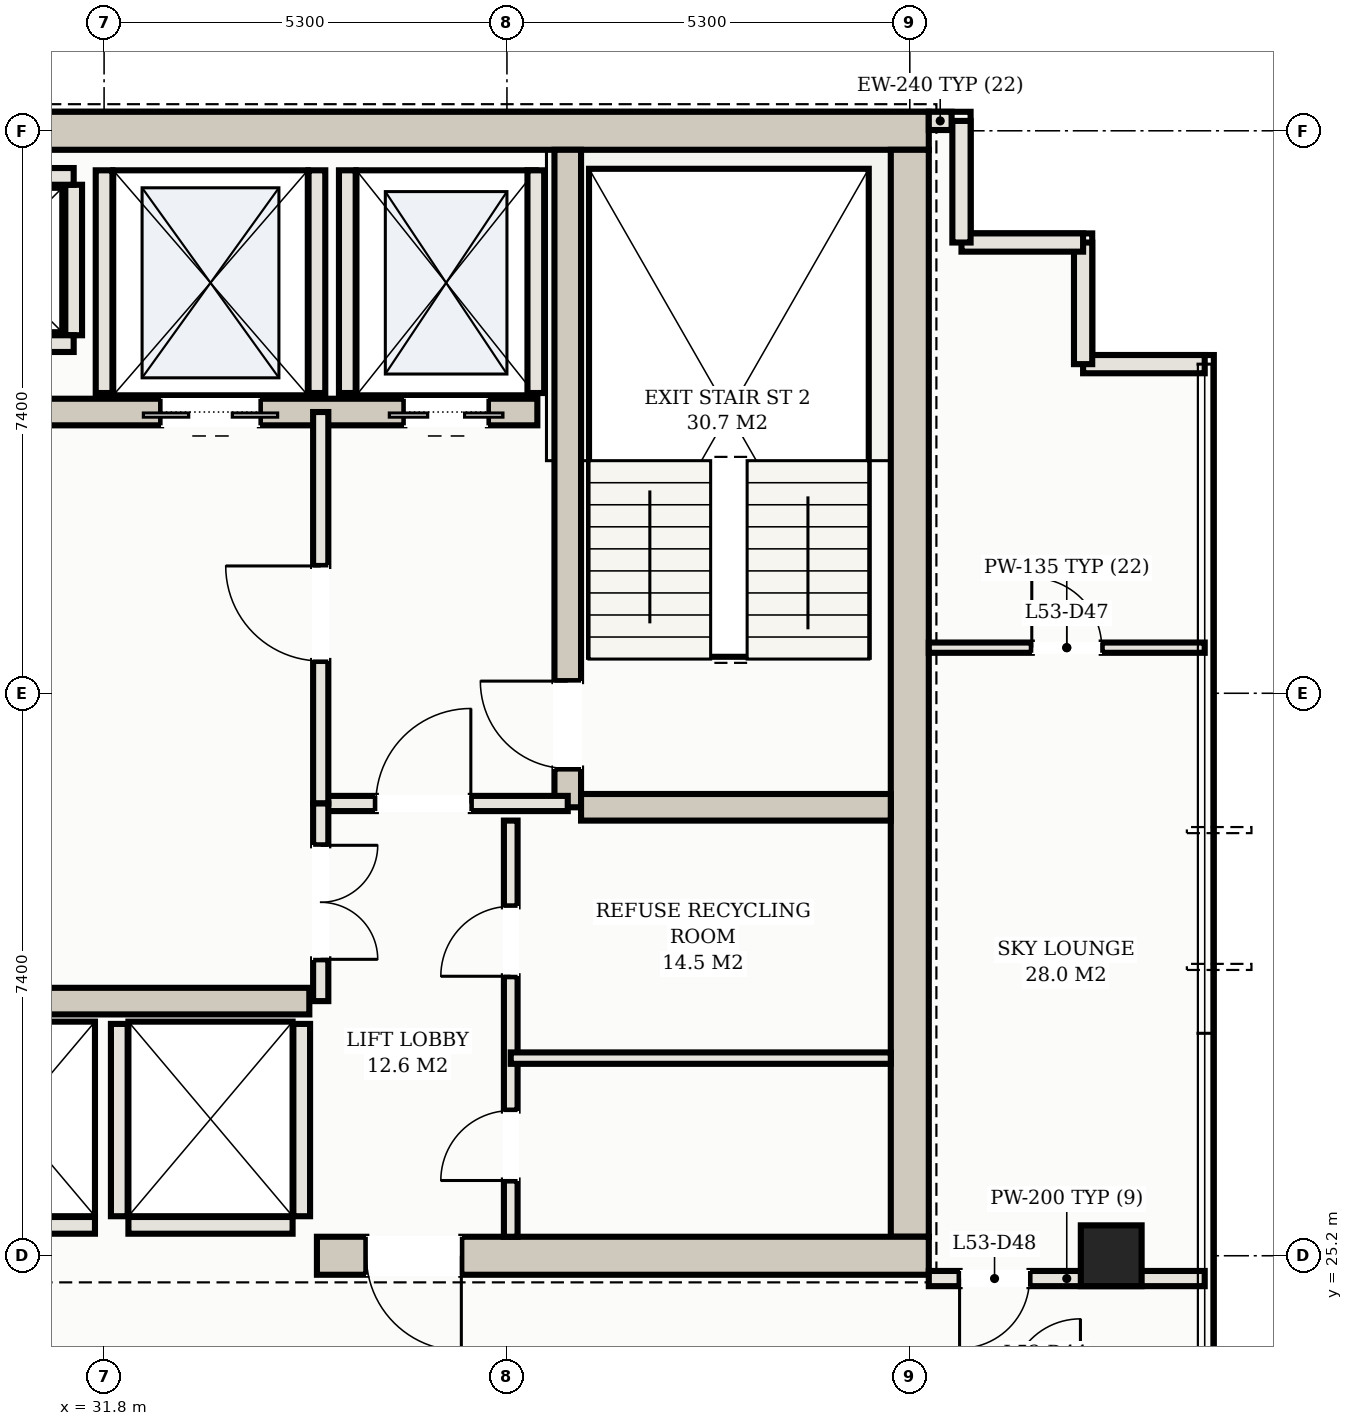
"""IFC4 building model, lengths in metres.
Left out: names, types, materials, properties, quantities, classifications, styles, units other than length and angle.
Written with IfcOpenShell. Run it as: python <this file> out.ifc"""

import sys

from ifc_helpers import new_model, si_unit, direction, frame, frame_2d, origin, origin_2d, place, context, subcontext, project, spatial, rectangle, hollow_rectangle, extrude, element, fill, save


model = new_model("IFC4")
c1 = context("Model", 3, precision=1e-05, world=origin(), true_north=direction((0.0, 1.0)))
c2 = subcontext(c1, "Body", "Model", "MODEL_VIEW")
j1 = project(units=[si_unit("LENGTHUNIT", "METRE"), si_unit("PLANEANGLEUNIT", "RADIAN")], contexts=[c1])
p1 = place(None, origin())
s1 = spatial("IfcSite", under=j1, at=p1, CompositionType="ELEMENT")
p2 = place(p1, origin())
s2 = spatial("IfcBuilding", under=s1, at=p2, CompositionType="ELEMENT")
p3 = place(p2, frame((0.0, 0.0, 196.7)))
s3 = spatial("IfcBuildingStorey", under=s2, at=p3, CompositionType="ELEMENT", Elevation=196.7)
p4 = place(p3, frame((10.35, 40.0, 0.0), z_axis=(0.0, 0.0, 1.0), x_axis=(1.0, 0.0, 0.0)))
e1 = element("IfcWall", 1, at=p4, inside=s3, PredefinedType="SHEAR", context=c2, shape_type="SweptSolid", body=[
    extrude(rectangle(XDim=32.3, YDim=0.5, at=frame_2d((16.15, 0.0))), origin(), (0.0, 0.0, 1.0), 3.11),
])
p5 = place(p3, frame((42.4, 25.45, 0.0), z_axis=(0.0, 0.0, 1.0), x_axis=(0.0, 1.0, 0.0)))
e2 = element("IfcWall", 2, at=p5, inside=s3, PredefinedType="SHEAR", context=c2, shape_type="SweptSolid", body=[
    extrude(rectangle(XDim=14.3, YDim=0.5, at=frame_2d((7.15, 0.0))), origin(), (0.0, 0.0, 1.0), 3.11),
])
p6 = place(p3, frame((34.6, 25.2, 0.0), z_axis=(0.0, 0.0, 1.0), x_axis=(1.0, 0.0, 0.0)))
e3 = element("IfcWall", 3, at=p6, inside=s3, PredefinedType="SHEAR", context=c2, shape_type="SweptSolid", body=[
    extrude(rectangle(XDim=8.05, YDim=0.5, at=frame_2d((4.025, 0.0))), origin(), (0.0, 0.0, 1.0), 3.11),
])
p7 = place(p6, frame((0.65, 0.0, 0.0)))
e4 = element("IfcOpeningElement", 4, at=p7, cuts=e3, PredefinedType="OPENING", context=c2, shape_type="SweptSolid", body=[
    extrude(rectangle(XDim=1.25, YDim=2.2, at=frame_2d((0.625, 1.1))), frame((0.0, 0.26, 0.0), z_axis=(0.0, -1.0, 0.0), x_axis=(1.0, 0.0, 0.0)), (0.0, 0.0, 1.0), 0.52),
])
p8 = place(p3, frame((37.9, 31.1, 0.0), z_axis=(0.0, 0.0, 1.0), x_axis=(0.0, 1.0, 0.0)))
e5 = element("IfcWall", 5, at=p8, inside=s3, PredefinedType="SHEAR", context=c2, shape_type="SweptSolid", body=[
    extrude(rectangle(XDim=8.65, YDim=0.35, at=frame_2d((4.325, 0.0))), origin(), (0.0, 0.0, 1.0), 3.11),
])
p9 = place(p8, frame((0.51, 0.0, 0.0)))
e6 = element("IfcOpeningElement", 6, at=p9, cuts=e5, PredefinedType="OPENING", context=c2, shape_type="SweptSolid", body=[
    extrude(rectangle(XDim=1.15, YDim=2.2, at=frame_2d((0.575, 1.1))), frame((0.0, 0.185, 0.0), z_axis=(0.0, -1.0, 0.0), x_axis=(1.0, 0.0, 0.0)), (0.0, 0.0, 1.0), 0.37),
])
p10 = place(p3, frame((38.075, 31.1, 0.0), z_axis=(0.0, 0.0, 1.0), x_axis=(1.0, 0.0, 0.0)))
e7 = element("IfcWall", 7, at=p10, inside=s3, PredefinedType="SHEAR", context=c2, shape_type="SweptSolid", body=[
    extrude(rectangle(XDim=4.075, YDim=0.35, at=frame_2d((2.038, 0.0))), origin(), (0.0, 0.0, 1.0), 3.11),
])
p11 = place(p3, frame((15.5, 36.3, 0.0), z_axis=(0.0, 0.0, 1.0), x_axis=(1.0, 0.0, 0.0)))
e8 = element("IfcWall", 8, at=p11, inside=s3, PredefinedType="SHEAR", context=c2, shape_type="SweptSolid", body=[
    extrude(rectangle(XDim=22.0, YDim=0.35, at=frame_2d((11.0, 0.0))), origin(), (0.0, 0.0, 1.0), 3.11),
])
p12 = place(p11, frame((0.65, 0.0, 0.0)))
e9 = element("IfcOpeningElement", 9, at=p12, cuts=e8, PredefinedType="OPENING", context=c2, shape_type="SweptSolid", body=[
    extrude(rectangle(XDim=1.1, YDim=2.15, at=frame_2d((0.55, 1.075))), frame((0.0, 0.185, 0.0), z_axis=(0.0, -1.0, 0.0), x_axis=(1.0, 0.0, 0.0)), (0.0, 0.0, 1.0), 0.37),
])
p13 = place(p11, frame((20.25, 0.0, 0.0)))
e10 = element("IfcOpeningElement", 10, at=p13, cuts=e8, PredefinedType="OPENING", context=c2, shape_type="SweptSolid", body=[
    extrude(rectangle(XDim=1.1, YDim=2.15, at=frame_2d((0.55, 1.075))), frame((0.0, 0.185, 0.0), z_axis=(0.0, -1.0, 0.0), x_axis=(1.0, 0.0, 0.0)), (0.0, 0.0, 1.0), 0.37),
])
p14 = place(p11, frame((17.05, 0.0, 0.0)))
e11 = element("IfcOpeningElement", 11, at=p14, cuts=e8, PredefinedType="OPENING", context=c2, shape_type="SweptSolid", body=[
    extrude(rectangle(XDim=1.3, YDim=2.2, at=frame_2d((0.65, 1.1))), frame((0.0, 0.185, 0.0), z_axis=(0.0, -1.0, 0.0), x_axis=(1.0, 0.0, 0.0)), (0.0, 0.0, 1.0), 0.37),
])
p15 = place(p11, frame((3.95, 0.0, 0.0)))
e12 = element("IfcOpeningElement", 12, at=p15, cuts=e8, PredefinedType="OPENING", context=c2, shape_type="SweptSolid", body=[
    extrude(rectangle(XDim=1.1, YDim=2.15, at=frame_2d((0.55, 1.075))), frame((0.0, 0.185, 0.0), z_axis=(0.0, -1.0, 0.0), x_axis=(1.0, 0.0, 0.0)), (0.0, 0.0, 1.0), 0.37),
])
p16 = place(p11, frame((6.55, 0.0, 0.0)))
e13 = element("IfcOpeningElement", 13, at=p16, cuts=e8, PredefinedType="OPENING", context=c2, shape_type="SweptSolid", body=[
    extrude(rectangle(XDim=1.1, YDim=2.15, at=frame_2d((0.55, 1.075))), frame((0.0, 0.185, 0.0), z_axis=(0.0, -1.0, 0.0), x_axis=(1.0, 0.0, 0.0)), (0.0, 0.0, 1.0), 0.37),
])
p17 = place(p11, frame((9.15, 0.0, 0.0)))
e14 = element("IfcOpeningElement", 14, at=p17, cuts=e8, PredefinedType="OPENING", context=c2, shape_type="SweptSolid", body=[
    extrude(rectangle(XDim=1.1, YDim=2.15, at=frame_2d((0.55, 1.075))), frame((0.0, 0.185, 0.0), z_axis=(0.0, -1.0, 0.0), x_axis=(1.0, 0.0, 0.0)), (0.0, 0.0, 1.0), 0.37),
])
p18 = place(p3, frame((18.5, 28.55, 0.0), z_axis=(0.0, 0.0, 1.0), x_axis=(1.0, 0.0, 0.0)))
e15 = element("IfcWall", 15, at=p18, inside=s3, PredefinedType="SHEAR", context=c2, shape_type="SweptSolid", body=[
    extrude(rectangle(XDim=16.0, YDim=0.35, at=frame_2d((8.0, 0.0))), origin(), (0.0, 0.0, 1.0), 3.11),
])
p19 = place(p3, frame((45.05, 25.2, 0.0), z_axis=(0.0, 0.0, 1.0), x_axis=(1.0, 0.0, 0.0)))
e16 = element("IfcColumn", 16, at=p19, inside=s3, PredefinedType="COLUMN", context=c2, shape_type="SweptSolid", body=[
    extrude(hollow_rectangle(XDim=0.8, YDim=0.8, WallThickness=0.028, at=origin_2d()), origin(), (0.0, 0.0, 1.0), 3.3),
])
for number, where, z_axis, x_axis in (
    (17, (35.0, 36.55, 0.0), (0.0, 0.0, 1.0), (0.0, 1.0, 0.0)),
    (18, (37.48, 36.55, 0.0), (0.0, 0.0, 1.0), (0.0, 1.0, 0.0)),
    (19, (31.8, 36.55, 0.0), (0.0, 0.0, 1.0), (0.0, 1.0, 0.0)),
    (20, (34.6, 36.55, 0.0), (0.0, 0.0, 1.0), (0.0, 1.0, 0.0)),
):
    element("IfcWall", number, at=place(p3, frame(where, z_axis=z_axis, x_axis=x_axis)), inside=s3, PredefinedType="SOLIDWALL", context=c2, shape_type="SweptSolid", body=[
        extrude(rectangle(XDim=2.93, YDim=0.22, at=frame_2d((1.465, 0.0))), origin(), (0.0, 0.0, 1.0), 3.11),
    ])
p20 = place(p3, frame((29.52, 25.6, 0.0), z_axis=(0.0, 0.0, 1.0), x_axis=(1.0, 0.0, 0.0)))
e21 = element("IfcWall", 21, at=p20, inside=s3, PredefinedType="SOLIDWALL", context=c2, shape_type="SweptSolid", body=[
    extrude(rectangle(XDim=2.16, YDim=0.22, at=frame_2d((1.08, 0.0))), origin(), (0.0, 0.0, 1.0), 2.305),
])
for number, where, z_axis, x_axis in (
    (22, (32.0, 25.72, 0.0), (0.0, 0.0, 1.0), (0.0, 1.0, 0.0)),
    (23, (34.4, 25.72, 0.0), (0.0, 0.0, 1.0), (0.0, 1.0, 0.0)),
):
    element("IfcWall", number, at=place(p3, frame(where, z_axis=z_axis, x_axis=x_axis)), inside=s3, PredefinedType="SOLIDWALL", context=c2, shape_type="SweptSolid", body=[
        extrude(rectangle(XDim=2.53, YDim=0.22, at=frame_2d((1.265, 0.0))), origin(), (0.0, 0.0, 1.0), 3.11),
    ])
p21 = place(p3, frame((32.12, 25.6, 0.0), z_axis=(0.0, 0.0, 1.0), x_axis=(1.0, 0.0, 0.0)))
e24 = element("IfcWall", 24, at=p21, inside=s3, PredefinedType="SOLIDWALL", context=c2, shape_type="SweptSolid", body=[
    extrude(rectangle(XDim=2.16, YDim=0.22, at=frame_2d((1.08, 0.0))), origin(), (0.0, 0.0, 1.0), 2.305),
])
p22 = place(p3, frame((31.4, 37.31, 0.0), z_axis=(0.0, 0.0, 1.0), x_axis=(0.0, 1.0, 0.0)))
e25 = element("IfcWall", 25, at=p22, inside=s3, PredefinedType="SOLIDWALL", context=c2, shape_type="SweptSolid", body=[
    extrude(rectangle(XDim=1.98, YDim=0.22, at=frame_2d((0.99, 0.0))), origin(), (0.0, 0.0, 1.0), 3.11),
])
for number, where, z_axis, x_axis in (
    (26, (29.2, 39.4, 0.0), (0.0, 0.0, 1.0), (1.0, 0.0, 0.0)),
    (27, (29.2, 37.2, 0.0), (0.0, 0.0, 1.0), (1.0, 0.0, 0.0)),
):
    element("IfcWall", number, at=place(p3, frame(where, z_axis=z_axis, x_axis=x_axis)), inside=s3, PredefinedType="SOLIDWALL", context=c2, shape_type="SweptSolid", body=[
        extrude(rectangle(XDim=2.2, YDim=0.22, at=frame_2d((1.1, 0.0))), origin(), (0.0, 0.0, 1.0), 3.11),
    ])
for number, where, z_axis, x_axis in (
    (28, (46.28, 36.93, 0.0), (0.0, 0.0, 1.0), (-1.0, 0.0, 0.0)),
    (29, (44.68, 36.93, 0.0), (0.0, 0.0, 1.0), (0.0, 1.0, 0.0)),
):
    element("IfcWall", number, at=place(p3, frame(where, z_axis=z_axis, x_axis=x_axis)), inside=s3, PredefinedType="SOLIDWALL", context=c2, shape_type="SweptSolid", body=[
        extrude(rectangle(XDim=1.6, YDim=0.24, at=frame_2d((0.8, 0.0))), origin(), (0.0, 0.0, 1.0), 3.11),
    ])
for number, where, z_axis, x_axis in (
    (30, (44.68, 38.53, 0.0), (0.0, 0.0, 1.0), (-1.0, 0.0, 0.0)),
    (31, (43.08, 38.53, 0.0), (0.0, 0.0, 1.0), (0.0, 1.0, 0.0)),
):
    element("IfcWall", number, at=place(p3, frame(where, z_axis=z_axis, x_axis=x_axis)), inside=s3, PredefinedType="SOLIDWALL", context=c2, shape_type="SweptSolid", body=[
        extrude(rectangle(XDim=1.6, YDim=0.24, at=frame_2d((0.8, 0.0))), origin(), (0.0, 0.0, 1.0), 3.11),
    ])
p23 = place(p3, frame((42.95, 40.13, 0.0), z_axis=(0.0, 0.0, 1.0), x_axis=(-1.0, 0.0, 0.0)))
e32 = element("IfcWall", 32, at=p23, inside=s3, PredefinedType="SOLIDWALL", context=c2, shape_type="SweptSolid", body=[
    extrude(rectangle(XDim=0.3, YDim=0.24, at=frame_2d((0.15, 0.0))), origin(), (0.0, 0.0, 1.0), 3.11),
])
p24 = place(p3, frame((34.65, 31.15, 0.0), z_axis=(0.0, 0.0, 1.0), x_axis=(1.0, 0.0, 0.0)))
e33 = element("IfcWall", 33, at=p24, inside=s3, PredefinedType="PARTITIONING", context=c2, shape_type="SweptSolid", body=[
    extrude(rectangle(XDim=3.25, YDim=0.2, at=frame_2d((1.625, 0.0))), origin(), (0.0, 0.0, 1.0), 2.43),
])
p25 = place(p24, frame((0.725, 0.0, 0.0)))
e34 = element("IfcOpeningElement", 34, at=p25, cuts=e33, PredefinedType="OPENING", context=c2, shape_type="SweptSolid", body=[
    extrude(rectangle(XDim=1.25, YDim=2.2, at=frame_2d((0.625, 1.1))), frame((0.0, 0.11, 0.0), z_axis=(0.0, -1.0, 0.0), x_axis=(1.0, 0.0, 0.0)), (0.0, 0.0, 1.0), 0.22),
])
p26 = place(p3, frame((34.65, 31.15, 0.0), z_axis=(0.0, 0.0, 1.0), x_axis=(0.0, 1.0, 0.0)))
e35 = element("IfcWall", 35, at=p26, inside=s3, PredefinedType="PARTITIONING", context=c2, shape_type="SweptSolid", body=[
    extrude(rectangle(XDim=5.15, YDim=0.2, at=frame_2d((2.575, 0.0))), origin(), (0.0, 0.0, 1.0), 2.43),
])
p27 = place(p26, frame((1.875, 0.0, 0.0)))
e36 = element("IfcOpeningElement", 36, at=p27, cuts=e35, PredefinedType="OPENING", context=c2, shape_type="SweptSolid", body=[
    extrude(rectangle(XDim=1.25, YDim=2.2, at=frame_2d((0.625, 1.1))), frame((0.0, 0.11, 0.0), z_axis=(0.0, -1.0, 0.0), x_axis=(1.0, 0.0, 0.0)), (0.0, 0.0, 1.0), 0.22),
])
p28 = place(p3, frame((37.15, 25.45, 0.0), z_axis=(0.0, 0.0, 1.0), x_axis=(0.0, 1.0, 0.0)))
e37 = element("IfcWall", 37, at=p28, inside=s3, PredefinedType="PARTITIONING", context=c2, shape_type="SweptSolid", body=[
    extrude(rectangle(XDim=5.475, YDim=0.18, at=frame_2d((2.738, 0.0))), origin(), (0.0, 0.0, 1.0), 2.43),
])
p29 = place(p28, frame((0.74, 0.0, 0.0)))
e38 = element("IfcOpeningElement", 38, at=p29, cuts=e37, PredefinedType="OPENING", context=c2, shape_type="SweptSolid", body=[
    extrude(rectangle(XDim=0.92, YDim=2.15, at=frame_2d((0.46, 1.075))), frame((0.0, 0.1, 0.0), z_axis=(0.0, -1.0, 0.0), x_axis=(1.0, 0.0, 0.0)), (0.0, 0.0, 1.0), 0.2),
])
p30 = place(p28, frame((3.427, 0.0, 0.0)))
e39 = element("IfcOpeningElement", 39, at=p30, cuts=e37, PredefinedType="OPENING", context=c2, shape_type="SweptSolid", body=[
    extrude(rectangle(XDim=0.92, YDim=2.15, at=frame_2d((0.46, 1.075))), frame((0.0, 0.1, 0.0), z_axis=(0.0, -1.0, 0.0), x_axis=(1.0, 0.0, 0.0)), (0.0, 0.0, 1.0), 0.2),
])
p31 = place(p3, frame((37.15, 27.8, 0.0), z_axis=(0.0, 0.0, 1.0), x_axis=(1.0, 0.0, 0.0)))
e40 = element("IfcWall", 40, at=p31, inside=s3, PredefinedType="PARTITIONING", context=c2, shape_type="SweptSolid", body=[
    extrude(rectangle(XDim=5.0, YDim=0.15, at=frame_2d((2.5, 0.0))), origin(), (0.0, 0.0, 1.0), 2.43),
])
p32 = place(p3, frame((34.65, 28.55, 0.0), z_axis=(0.0, 0.0, 1.0), x_axis=(0.0, 1.0, 0.0)))
e41 = element("IfcWall", 41, at=p32, inside=s3, PredefinedType="PARTITIONING", context=c2, shape_type="SweptSolid", body=[
    extrude(rectangle(XDim=2.6, YDim=0.2, at=frame_2d((1.3, 0.0))), origin(), (0.0, 0.0, 1.0), 2.43),
])
p33 = place(p32, frame((0.55, 0.0, 0.0)))
e42 = element("IfcOpeningElement", 42, at=p33, cuts=e41, PredefinedType="OPENING", context=c2, shape_type="SweptSolid", body=[
    extrude(rectangle(XDim=1.5, YDim=2.25, at=frame_2d((0.75, 1.125))), frame((0.0, 0.11, 0.0), z_axis=(0.0, -1.0, 0.0), x_axis=(1.0, 0.0, 0.0)), (0.0, 0.0, 1.0), 0.22),
])
p34 = place(p3, frame((42.65, 24.9, 0.0), z_axis=(0.0, 0.0, 1.0), x_axis=(1.0, 0.0, 0.0)))
e43 = element("IfcWall", 43, at=p34, inside=s3, PredefinedType="PARTITIONING", context=c2, shape_type="SweptSolid", body=[
    extrude(rectangle(XDim=3.63, YDim=0.2, at=frame_2d((1.815, 0.0))), origin(), (0.0, 0.0, 1.0), 2.43),
])
p35 = place(p34, frame((0.405, 0.0, 0.0)))
e44 = element("IfcOpeningElement", 44, at=p35, cuts=e43, PredefinedType="OPENING", context=c2, shape_type="SweptSolid", body=[
    extrude(rectangle(XDim=0.92, YDim=2.15, at=frame_2d((0.46, 1.075))), frame((0.0, 0.11, 0.0), z_axis=(0.0, -1.0, 0.0), x_axis=(1.0, 0.0, 0.0)), (0.0, 0.0, 1.0), 0.22),
])
p36 = place(p3, frame((42.65, 33.2, 0.0), z_axis=(0.0, 0.0, 1.0), x_axis=(1.0, 0.0, 0.0)))
e45 = element("IfcWall", 45, at=p36, inside=s3, PredefinedType="PARTITIONING", context=c2, shape_type="SweptSolid", body=[
    extrude(rectangle(XDim=3.63, YDim=0.135, at=frame_2d((1.815, 0.0))), origin(), (0.0, 0.0, 1.0), 2.43),
])
p37 = place(p36, frame((1.355, 0.0, 0.0)))
e46 = element("IfcOpeningElement", 46, at=p37, cuts=e45, PredefinedType="OPENING", context=c2, shape_type="SweptSolid", body=[
    extrude(rectangle(XDim=0.92, YDim=2.15, at=frame_2d((0.46, 1.075))), frame((0.0, 0.078, 0.0), z_axis=(0.0, -1.0, 0.0), x_axis=(1.0, 0.0, 0.0)), (0.0, 0.0, 1.0), 0.155),
])
p38 = place(p13, frame((1.1, 0.0, 0.0), z_axis=(0.0, 0.0, 1.0), x_axis=(-1.0, 0.0, 0.0)))
e47 = element("IfcDoor", 47, at=p38, inside=s3, OperationType="DOUBLE_DOOR_SLIDING", PredefinedType="DOOR", context=c2, shape_type="SweptSolid", body=[
    extrude(rectangle(XDim=1.1, YDim=2.15, at=frame_2d((0.55, 1.075))), frame((0.0, 0.025, 0.0), z_axis=(0.0, -1.0, 0.0), x_axis=(1.0, 0.0, 0.0)), (0.0, 0.0, 1.0), 0.05),
])
fill(e10, e47)
p39 = place(p14, frame((1.3, 0.0, 0.0), z_axis=(0.0, 0.0, 1.0), x_axis=(-1.0, 0.0, 0.0)))
e48 = element("IfcDoor", 48, at=p39, inside=s3, OperationType="DOUBLE_DOOR_SLIDING", PredefinedType="DOOR", context=c2, shape_type="SweptSolid", body=[
    extrude(rectangle(XDim=1.3, YDim=2.2, at=frame_2d((0.65, 1.1))), frame((0.0, 0.025, 0.0), z_axis=(0.0, -1.0, 0.0), x_axis=(1.0, 0.0, 0.0)), (0.0, 0.0, 1.0), 0.05),
])
fill(e11, e48)
p40 = place(p7, frame((1.25, 0.0, 0.0), z_axis=(0.0, 0.0, 1.0), x_axis=(-1.0, 0.0, 0.0)))
e49 = element("IfcDoor", 49, at=p40, inside=s3, OperationType="SINGLE_SWING_LEFT", PredefinedType="DOOR", context=c2, shape_type="SweptSolid", body=[
    extrude(rectangle(XDim=1.25, YDim=2.2, at=frame_2d((0.625, 1.1))), frame((0.0, 0.025, 0.0), z_axis=(0.0, -1.0, 0.0), x_axis=(1.0, 0.0, 0.0)), (0.0, 0.0, 1.0), 0.05),
])
fill(e4, e49)
p41 = place(p25, origin())
e50 = element("IfcDoor", 50, at=p41, inside=s3, OperationType="SINGLE_SWING_RIGHT", PredefinedType="DOOR", context=c2, shape_type="SweptSolid", body=[
    extrude(rectangle(XDim=1.25, YDim=2.2, at=frame_2d((0.625, 1.1))), frame((0.0, 0.025, 0.0), z_axis=(0.0, -1.0, 0.0), x_axis=(1.0, 0.0, 0.0)), (0.0, 0.0, 1.0), 0.05),
])
fill(e34, e50)
p42 = place(p27, origin())
e51 = element("IfcDoor", 51, at=p42, inside=s3, OperationType="SINGLE_SWING_RIGHT", PredefinedType="DOOR", context=c2, shape_type="SweptSolid", body=[
    extrude(rectangle(XDim=1.25, YDim=2.2, at=frame_2d((0.625, 1.1))), frame((0.0, 0.025, 0.0), z_axis=(0.0, -1.0, 0.0), x_axis=(1.0, 0.0, 0.0)), (0.0, 0.0, 1.0), 0.05),
])
fill(e36, e51)
p43 = place(p9, origin())
e52 = element("IfcDoor", 52, at=p43, inside=s3, OperationType="SINGLE_SWING_RIGHT", PredefinedType="DOOR", context=c2, shape_type="SweptSolid", body=[
    extrude(rectangle(XDim=1.15, YDim=2.2, at=frame_2d((0.575, 1.1))), frame((0.0, 0.025, 0.0), z_axis=(0.0, -1.0, 0.0), x_axis=(1.0, 0.0, 0.0)), (0.0, 0.0, 1.0), 0.05),
])
fill(e6, e52)
p44 = place(p29, origin())
e53 = element("IfcDoor", 53, at=p44, inside=s3, OperationType="SINGLE_SWING_LEFT", PredefinedType="DOOR", context=c2, shape_type="SweptSolid", body=[
    extrude(rectangle(XDim=0.92, YDim=2.15, at=frame_2d((0.46, 1.075))), frame((0.0, 0.025, 0.0), z_axis=(0.0, -1.0, 0.0), x_axis=(1.0, 0.0, 0.0)), (0.0, 0.0, 1.0), 0.05),
])
fill(e38, e53)
p45 = place(p30, origin())
e54 = element("IfcDoor", 54, at=p45, inside=s3, OperationType="SINGLE_SWING_LEFT", PredefinedType="DOOR", context=c2, shape_type="SweptSolid", body=[
    extrude(rectangle(XDim=0.92, YDim=2.15, at=frame_2d((0.46, 1.075))), frame((0.0, 0.025, 0.0), z_axis=(0.0, -1.0, 0.0), x_axis=(1.0, 0.0, 0.0)), (0.0, 0.0, 1.0), 0.05),
])
fill(e39, e54)
p46 = place(p33, frame((1.5, 0.0, 0.0), z_axis=(0.0, 0.0, 1.0), x_axis=(-1.0, 0.0, 0.0)))
e55 = element("IfcDoor", 55, at=p46, inside=s3, OperationType="DOUBLE_DOOR_SINGLE_SWING", PredefinedType="DOOR", context=c2, shape_type="SweptSolid", body=[
    extrude(rectangle(XDim=1.5, YDim=2.25, at=frame_2d((0.75, 1.125))), frame((0.0, 0.025, 0.0), z_axis=(0.0, -1.0, 0.0), x_axis=(1.0, 0.0, 0.0)), (0.0, 0.0, 1.0), 0.05),
])
fill(e42, e55)
p47 = place(p37, origin())
e56 = element("IfcDoor", 56, at=p47, inside=s3, OperationType="SINGLE_SWING_LEFT", PredefinedType="DOOR", context=c2, shape_type="SweptSolid", body=[
    extrude(rectangle(XDim=0.92, YDim=2.15, at=frame_2d((0.46, 1.075))), frame((0.0, 0.025, 0.0), z_axis=(0.0, -1.0, 0.0), x_axis=(1.0, 0.0, 0.0)), (0.0, 0.0, 1.0), 0.05),
])
fill(e46, e56)
p48 = place(p35, frame((0.92, 0.0, 0.0), z_axis=(0.0, 0.0, 1.0), x_axis=(-1.0, 0.0, 0.0)))
e57 = element("IfcDoor", 57, at=p48, inside=s3, OperationType="SINGLE_SWING_RIGHT", PredefinedType="DOOR", context=c2, shape_type="SweptSolid", body=[
    extrude(rectangle(XDim=0.92, YDim=2.15, at=frame_2d((0.46, 1.075))), frame((0.0, 0.025, 0.0), z_axis=(0.0, -1.0, 0.0), x_axis=(1.0, 0.0, 0.0)), (0.0, 0.0, 1.0), 0.05),
])
fill(e44, e57)
save(model, sys.argv[1])
